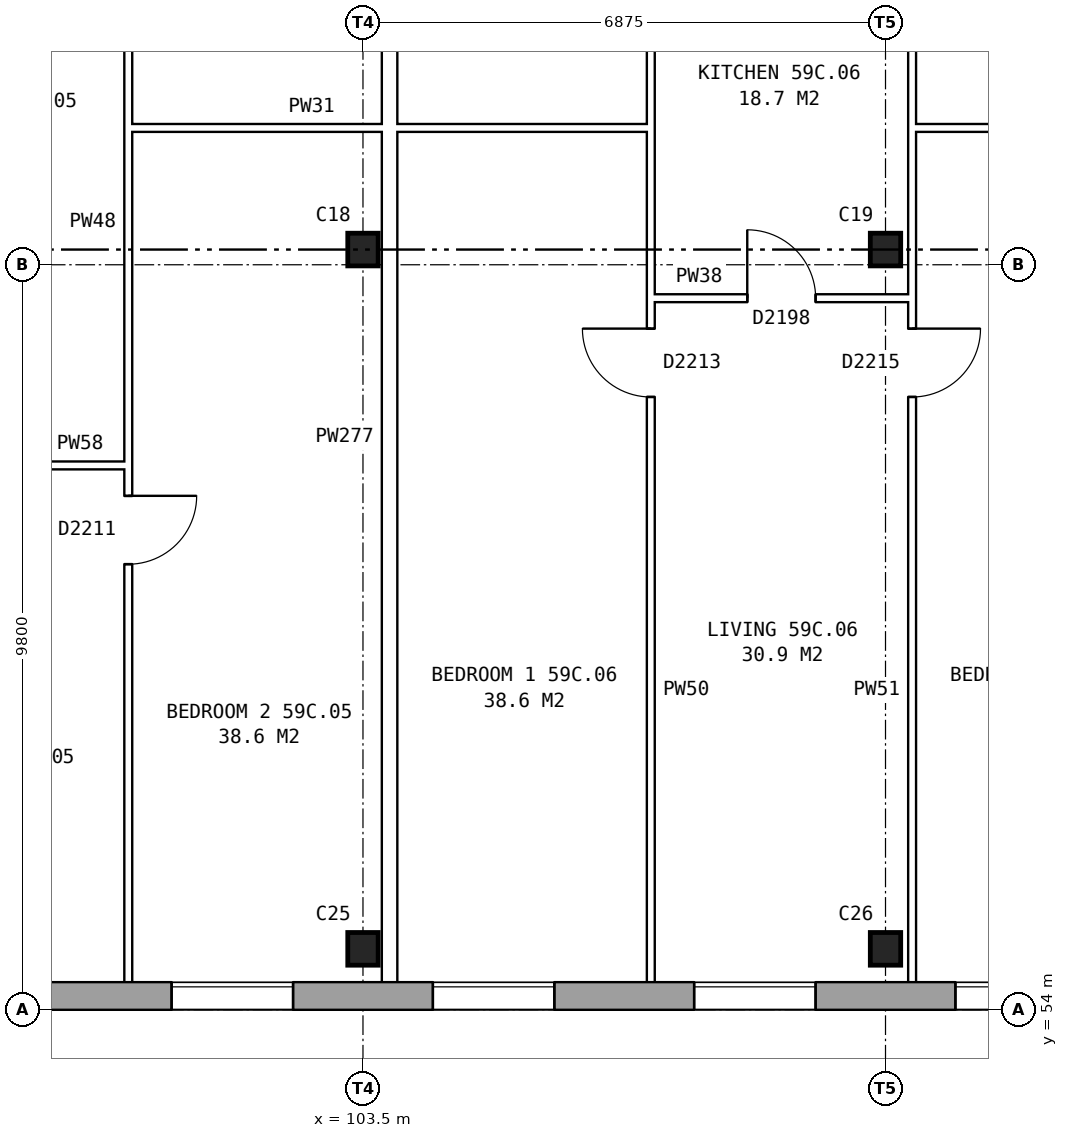
"""IFC4 building model, lengths in metres.
Left out: names, types, materials, properties, quantities, classifications, styles, units other than length and angle.
Written with IfcOpenShell. Run it as: python <this file> out.ifc"""

import sys

from ifc_helpers import new_model, si_unit, direction, frame, frame_2d, origin, origin_2d, place, context, subcontext, project, spatial, rectangle, i_section, extrude, element, fill, save


model = new_model("IFC4")
c1 = context("Model", 3, precision=1e-05, world=origin(), true_north=direction((0.0, 1.0)))
c2 = subcontext(c1, "Body", "Model", "MODEL_VIEW")
j1 = project(units=[si_unit("LENGTHUNIT", "METRE"), si_unit("PLANEANGLEUNIT", "RADIAN")], contexts=[c1])
p1 = place(None, origin())
s1 = spatial("IfcSite", under=j1, at=p1, CompositionType="ELEMENT")
p2 = place(p1, origin())
s2 = spatial("IfcBuilding", under=s1, at=p2, CompositionType="ELEMENT")
p3 = place(p2, frame((0.0, 0.0, 209.0)))
s3 = spatial("IfcBuildingStorey", under=s2, at=p3, CompositionType="ELEMENT", Elevation=209.0)
for number, where, z_axis, x_axis in (
    (1, (103.5, 54.8, 0.0), (0.0, 0.0, 1.0), (1.0, 0.0, 0.0)),
    (2, (110.375, 54.8, 0.0), (0.0, 0.0, 1.0), (1.0, 0.0, 0.0)),
    (3, (103.5, 64.0, 0.0), (0.0, 0.0, 1.0), (1.0, 0.0, 0.0)),
    (4, (110.375, 64.0, 0.0), (0.0, 0.0, 1.0), (1.0, 0.0, 0.0)),
):
    element("IfcColumn", number, at=place(p3, frame(where, z_axis=z_axis, x_axis=x_axis)), inside=s3, PredefinedType="COLUMN", context=c2, shape_type="SweptSolid", body=[
        extrude(i_section(OverallWidth=0.4, OverallDepth=0.43, WebThickness=0.04, FlangeThickness=0.04, at=origin_2d()), origin(), (0.0, 0.0, 1.0), 2.85),
    ])
p4 = place(p3, frame((75.95, 54.18, 0.0), z_axis=(0.0, 0.0, 1.0), x_axis=(1.0, 0.0, 0.0)))
e5 = element("IfcWall", 5, at=p4, inside=s3, PredefinedType="STANDARD", context=c2, shape_type="SweptSolid", body=[
    extrude(rectangle(XDim=55.1, YDim=0.36, at=frame_2d((27.55, 0.0))), origin(), (0.0, 0.0, 1.0), 2.85),
])
p5 = place(p4, frame((0.969, 0.0, 0.8)))
e6 = element("IfcOpeningElement", 6, at=p5, cuts=e5, PredefinedType="OPENING", context=c2, shape_type="SweptSolid", body=[
    extrude(rectangle(XDim=1.6, YDim=1.8, at=frame_2d((0.8, 0.9))), frame((0.0, 0.19, 0.0), z_axis=(0.0, -1.0, 0.0), x_axis=(1.0, 0.0, 0.0)), (0.0, 0.0, 1.0), 0.38),
])
p6 = place(p4, frame((4.406, 0.0, 0.8)))
e7 = element("IfcOpeningElement", 7, at=p6, cuts=e5, PredefinedType="OPENING", context=c2, shape_type="SweptSolid", body=[
    extrude(rectangle(XDim=1.6, YDim=1.8, at=frame_2d((0.8, 0.9))), frame((0.0, 0.19, 0.0), z_axis=(0.0, -1.0, 0.0), x_axis=(1.0, 0.0, 0.0)), (0.0, 0.0, 1.0), 0.38),
])
p7 = place(p4, frame((7.844, 0.0, 0.8)))
e8 = element("IfcOpeningElement", 8, at=p7, cuts=e5, PredefinedType="OPENING", context=c2, shape_type="SweptSolid", body=[
    extrude(rectangle(XDim=1.6, YDim=1.8, at=frame_2d((0.8, 0.9))), frame((0.0, 0.19, 0.0), z_axis=(0.0, -1.0, 0.0), x_axis=(1.0, 0.0, 0.0)), (0.0, 0.0, 1.0), 0.38),
])
p8 = place(p4, frame((11.281, 0.0, 0.8)))
e9 = element("IfcOpeningElement", 9, at=p8, cuts=e5, PredefinedType="OPENING", context=c2, shape_type="SweptSolid", body=[
    extrude(rectangle(XDim=1.6, YDim=1.8, at=frame_2d((0.8, 0.9))), frame((0.0, 0.19, 0.0), z_axis=(0.0, -1.0, 0.0), x_axis=(1.0, 0.0, 0.0)), (0.0, 0.0, 1.0), 0.38),
])
p9 = place(p4, frame((14.719, 0.0, 0.8)))
e10 = element("IfcOpeningElement", 10, at=p9, cuts=e5, PredefinedType="OPENING", context=c2, shape_type="SweptSolid", body=[
    extrude(rectangle(XDim=1.6, YDim=1.8, at=frame_2d((0.8, 0.9))), frame((0.0, 0.19, 0.0), z_axis=(0.0, -1.0, 0.0), x_axis=(1.0, 0.0, 0.0)), (0.0, 0.0, 1.0), 0.38),
])
p10 = place(p4, frame((18.156, 0.0, 0.8)))
e11 = element("IfcOpeningElement", 11, at=p10, cuts=e5, PredefinedType="OPENING", context=c2, shape_type="SweptSolid", body=[
    extrude(rectangle(XDim=1.6, YDim=1.8, at=frame_2d((0.8, 0.9))), frame((0.0, 0.19, 0.0), z_axis=(0.0, -1.0, 0.0), x_axis=(1.0, 0.0, 0.0)), (0.0, 0.0, 1.0), 0.38),
])
p11 = place(p4, frame((21.594, 0.0, 0.8)))
e12 = element("IfcOpeningElement", 12, at=p11, cuts=e5, PredefinedType="OPENING", context=c2, shape_type="SweptSolid", body=[
    extrude(rectangle(XDim=1.6, YDim=1.8, at=frame_2d((0.8, 0.9))), frame((0.0, 0.19, 0.0), z_axis=(0.0, -1.0, 0.0), x_axis=(1.0, 0.0, 0.0)), (0.0, 0.0, 1.0), 0.38),
])
p12 = place(p4, frame((25.031, 0.0, 0.8)))
e13 = element("IfcOpeningElement", 13, at=p12, cuts=e5, PredefinedType="OPENING", context=c2, shape_type="SweptSolid", body=[
    extrude(rectangle(XDim=1.6, YDim=1.8, at=frame_2d((0.8, 0.9))), frame((0.0, 0.19, 0.0), z_axis=(0.0, -1.0, 0.0), x_axis=(1.0, 0.0, 0.0)), (0.0, 0.0, 1.0), 0.38),
])
p13 = place(p4, frame((28.469, 0.0, 0.8)))
e14 = element("IfcOpeningElement", 14, at=p13, cuts=e5, PredefinedType="OPENING", context=c2, shape_type="SweptSolid", body=[
    extrude(rectangle(XDim=1.6, YDim=1.8, at=frame_2d((0.8, 0.9))), frame((0.0, 0.19, 0.0), z_axis=(0.0, -1.0, 0.0), x_axis=(1.0, 0.0, 0.0)), (0.0, 0.0, 1.0), 0.38),
])
p14 = place(p4, frame((31.906, 0.0, 0.8)))
e15 = element("IfcOpeningElement", 15, at=p14, cuts=e5, PredefinedType="OPENING", context=c2, shape_type="SweptSolid", body=[
    extrude(rectangle(XDim=1.6, YDim=1.8, at=frame_2d((0.8, 0.9))), frame((0.0, 0.19, 0.0), z_axis=(0.0, -1.0, 0.0), x_axis=(1.0, 0.0, 0.0)), (0.0, 0.0, 1.0), 0.38),
])
p15 = place(p4, frame((35.344, 0.0, 0.8)))
e16 = element("IfcOpeningElement", 16, at=p15, cuts=e5, PredefinedType="OPENING", context=c2, shape_type="SweptSolid", body=[
    extrude(rectangle(XDim=1.6, YDim=1.8, at=frame_2d((0.8, 0.9))), frame((0.0, 0.19, 0.0), z_axis=(0.0, -1.0, 0.0), x_axis=(1.0, 0.0, 0.0)), (0.0, 0.0, 1.0), 0.38),
])
p16 = place(p4, frame((38.781, 0.0, 0.8)))
e17 = element("IfcOpeningElement", 17, at=p16, cuts=e5, PredefinedType="OPENING", context=c2, shape_type="SweptSolid", body=[
    extrude(rectangle(XDim=1.6, YDim=1.8, at=frame_2d((0.8, 0.9))), frame((0.0, 0.19, 0.0), z_axis=(0.0, -1.0, 0.0), x_axis=(1.0, 0.0, 0.0)), (0.0, 0.0, 1.0), 0.38),
])
p17 = place(p4, frame((42.219, 0.0, 0.8)))
e18 = element("IfcOpeningElement", 18, at=p17, cuts=e5, PredefinedType="OPENING", context=c2, shape_type="SweptSolid", body=[
    extrude(rectangle(XDim=1.6, YDim=1.8, at=frame_2d((0.8, 0.9))), frame((0.0, 0.19, 0.0), z_axis=(0.0, -1.0, 0.0), x_axis=(1.0, 0.0, 0.0)), (0.0, 0.0, 1.0), 0.38),
])
p18 = place(p4, frame((45.656, 0.0, 0.8)))
e19 = element("IfcOpeningElement", 19, at=p18, cuts=e5, PredefinedType="OPENING", context=c2, shape_type="SweptSolid", body=[
    extrude(rectangle(XDim=1.6, YDim=1.8, at=frame_2d((0.8, 0.9))), frame((0.0, 0.19, 0.0), z_axis=(0.0, -1.0, 0.0), x_axis=(1.0, 0.0, 0.0)), (0.0, 0.0, 1.0), 0.38),
])
p19 = place(p4, frame((49.094, 0.0, 0.8)))
e20 = element("IfcOpeningElement", 20, at=p19, cuts=e5, PredefinedType="OPENING", context=c2, shape_type="SweptSolid", body=[
    extrude(rectangle(XDim=1.6, YDim=1.8, at=frame_2d((0.8, 0.9))), frame((0.0, 0.19, 0.0), z_axis=(0.0, -1.0, 0.0), x_axis=(1.0, 0.0, 0.0)), (0.0, 0.0, 1.0), 0.38),
])
p20 = place(p4, frame((52.531, 0.0, 0.8)))
e21 = element("IfcOpeningElement", 21, at=p20, cuts=e5, PredefinedType="OPENING", context=c2, shape_type="SweptSolid", body=[
    extrude(rectangle(XDim=1.6, YDim=1.8, at=frame_2d((0.8, 0.9))), frame((0.0, 0.19, 0.0), z_axis=(0.0, -1.0, 0.0), x_axis=(1.0, 0.0, 0.0)), (0.0, 0.0, 1.0), 0.38),
])
p21 = place(p3, frame((96.975, 61.16, 0.0), z_axis=(0.0, 0.0, 1.0), x_axis=(1.0, 0.0, 0.0)))
e22 = element("IfcWall", 22, at=p21, inside=s3, PredefinedType="PARTITIONING", context=c2, shape_type="SweptSolid", body=[
    extrude(rectangle(XDim=3.437, YDim=0.1, at=frame_2d((1.719, 0.0))), origin(), (0.0, 0.0, 1.0), 2.85),
])
p22 = place(p21, frame((1.269, 0.0, 0.0)))
e23 = element("IfcOpeningElement", 23, at=p22, cuts=e22, PredefinedType="OPENING", context=c2, shape_type="SweptSolid", body=[
    extrude(rectangle(XDim=0.9, YDim=2.1, at=frame_2d((0.45, 1.05))), frame((0.0, 0.06, 0.0), z_axis=(0.0, -1.0, 0.0), x_axis=(1.0, 0.0, 0.0)), (0.0, 0.0, 1.0), 0.12),
])
p23 = place(p3, frame((107.287, 63.36, 0.0), z_axis=(0.0, 0.0, 1.0), x_axis=(1.0, 0.0, 0.0)))
e24 = element("IfcWall", 24, at=p23, inside=s3, PredefinedType="PARTITIONING", context=c2, shape_type="SweptSolid", body=[
    extrude(rectangle(XDim=3.438, YDim=0.1, at=frame_2d((1.719, 0.0))), origin(), (0.0, 0.0, 1.0), 2.85),
])
p24 = place(p23, frame((1.269, 0.0, 0.0)))
e25 = element("IfcOpeningElement", 25, at=p24, cuts=e24, PredefinedType="OPENING", context=c2, shape_type="SweptSolid", body=[
    extrude(rectangle(XDim=0.9, YDim=2.1, at=frame_2d((0.45, 1.05))), frame((0.0, 0.06, 0.0), z_axis=(0.0, -1.0, 0.0), x_axis=(1.0, 0.0, 0.0)), (0.0, 0.0, 1.0), 0.12),
])
p25 = place(p3, frame((100.412, 65.6, 0.0), z_axis=(0.0, 0.0, 1.0), x_axis=(1.0, 0.0, 0.0)))
e26 = element("IfcWall", 26, at=p25, inside=s3, PredefinedType="PARTITIONING", context=c2, shape_type="SweptSolid", body=[
    extrude(rectangle(XDim=6.875, YDim=0.1, at=frame_2d((3.438, 0.0))), origin(), (0.0, 0.0, 1.0), 2.85),
])
p26 = place(p3, frame((110.725, 65.6, 0.0), z_axis=(0.0, 0.0, 1.0), x_axis=(1.0, 0.0, 0.0)))
e27 = element("IfcWall", 27, at=p26, inside=s3, PredefinedType="PARTITIONING", context=c2, shape_type="SweptSolid", body=[
    extrude(rectangle(XDim=3.337, YDim=0.1, at=frame_2d((1.668, 0.0))), origin(), (0.0, 0.0, 1.0), 2.85),
])
p27 = place(p3, frame((100.412, 54.36, 0.0), z_axis=(0.0, 0.0, 1.0), x_axis=(0.0, 1.0, 0.0)))
e28 = element("IfcWall", 28, at=p27, inside=s3, PredefinedType="PARTITIONING", context=c2, shape_type="SweptSolid", body=[
    extrude(rectangle(XDim=14.34, YDim=0.1, at=frame_2d((7.17, 0.0))), origin(), (0.0, 0.0, 1.0), 2.85),
])
p28 = place(p27, frame((5.5, 0.0, 0.0)))
e29 = element("IfcOpeningElement", 29, at=p28, cuts=e28, PredefinedType="OPENING", context=c2, shape_type="SweptSolid", body=[
    extrude(rectangle(XDim=0.9, YDim=2.1, at=frame_2d((0.45, 1.05))), frame((0.0, 0.06, 0.0), z_axis=(0.0, -1.0, 0.0), x_axis=(1.0, 0.0, 0.0)), (0.0, 0.0, 1.0), 0.12),
])
p29 = place(p27, frame((13.04, 0.0, 0.0)))
e30 = element("IfcOpeningElement", 30, at=p29, cuts=e28, PredefinedType="OPENING", context=c2, shape_type="SweptSolid", body=[
    extrude(rectangle(XDim=0.9, YDim=2.1, at=frame_2d((0.45, 1.05))), frame((0.0, 0.06, 0.0), z_axis=(0.0, -1.0, 0.0), x_axis=(1.0, 0.0, 0.0)), (0.0, 0.0, 1.0), 0.12),
])
p30 = place(p3, frame((103.85, 54.36, 0.0), z_axis=(0.0, 0.0, 1.0), x_axis=(0.0, 1.0, 0.0)))
e31 = element("IfcWall", 31, at=p30, inside=s3, PredefinedType="PARTITIONING", context=c2, shape_type="SweptSolid", body=[
    extrude(rectangle(XDim=14.34, YDim=0.2, at=frame_2d((7.17, 0.0))), origin(), (0.0, 0.0, 1.0), 2.85),
])
p31 = place(p3, frame((107.287, 54.36, 0.0), z_axis=(0.0, 0.0, 1.0), x_axis=(0.0, 1.0, 0.0)))
e32 = element("IfcWall", 32, at=p31, inside=s3, PredefinedType="PARTITIONING", context=c2, shape_type="SweptSolid", body=[
    extrude(rectangle(XDim=14.34, YDim=0.1, at=frame_2d((7.17, 0.0))), origin(), (0.0, 0.0, 1.0), 2.85),
])
p32 = place(p31, frame((7.7, 0.0, 0.0)))
e33 = element("IfcOpeningElement", 33, at=p32, cuts=e32, PredefinedType="OPENING", context=c2, shape_type="SweptSolid", body=[
    extrude(rectangle(XDim=0.9, YDim=2.1, at=frame_2d((0.45, 1.05))), frame((0.0, 0.06, 0.0), z_axis=(0.0, -1.0, 0.0), x_axis=(1.0, 0.0, 0.0)), (0.0, 0.0, 1.0), 0.12),
])
p33 = place(p31, frame((13.04, 0.0, 0.0)))
e34 = element("IfcOpeningElement", 34, at=p33, cuts=e32, PredefinedType="OPENING", context=c2, shape_type="SweptSolid", body=[
    extrude(rectangle(XDim=0.9, YDim=2.1, at=frame_2d((0.45, 1.05))), frame((0.0, 0.06, 0.0), z_axis=(0.0, -1.0, 0.0), x_axis=(1.0, 0.0, 0.0)), (0.0, 0.0, 1.0), 0.12),
])
p34 = place(p3, frame((110.725, 54.36, 0.0), z_axis=(0.0, 0.0, 1.0), x_axis=(0.0, 1.0, 0.0)))
e35 = element("IfcWall", 35, at=p34, inside=s3, PredefinedType="PARTITIONING", context=c2, shape_type="SweptSolid", body=[
    extrude(rectangle(XDim=14.34, YDim=0.1, at=frame_2d((7.17, 0.0))), origin(), (0.0, 0.0, 1.0), 2.85),
])
p35 = place(p34, frame((7.7, 0.0, 0.0)))
e36 = element("IfcOpeningElement", 36, at=p35, cuts=e35, PredefinedType="OPENING", context=c2, shape_type="SweptSolid", body=[
    extrude(rectangle(XDim=0.9, YDim=2.1, at=frame_2d((0.45, 1.05))), frame((0.0, 0.06, 0.0), z_axis=(0.0, -1.0, 0.0), x_axis=(1.0, 0.0, 0.0)), (0.0, 0.0, 1.0), 0.12),
])
p36 = place(p34, frame((13.04, 0.0, 0.0)))
e37 = element("IfcOpeningElement", 37, at=p36, cuts=e35, PredefinedType="OPENING", context=c2, shape_type="SweptSolid", body=[
    extrude(rectangle(XDim=0.9, YDim=2.1, at=frame_2d((0.45, 1.05))), frame((0.0, 0.06, 0.0), z_axis=(0.0, -1.0, 0.0), x_axis=(1.0, 0.0, 0.0)), (0.0, 0.0, 1.0), 0.12),
])
p37 = place(p12, origin())
e38 = element("IfcWindow", 38, at=p37, inside=s3, PartitioningType="SINGLE_PANEL", PredefinedType="WINDOW", context=c2, shape_type="SweptSolid", body=[
    extrude(rectangle(XDim=1.6, YDim=1.8, at=frame_2d((0.8, 0.9))), frame((0.0, 0.15, 0.0), z_axis=(0.0, -1.0, 0.0), x_axis=(1.0, 0.0, 0.0)), (0.0, 0.0, 1.0), 0.06),
])
fill(e13, e38)
p38 = place(p13, origin())
e39 = element("IfcWindow", 39, at=p38, inside=s3, PartitioningType="SINGLE_PANEL", PredefinedType="WINDOW", context=c2, shape_type="SweptSolid", body=[
    extrude(rectangle(XDim=1.6, YDim=1.8, at=frame_2d((0.8, 0.9))), frame((0.0, 0.15, 0.0), z_axis=(0.0, -1.0, 0.0), x_axis=(1.0, 0.0, 0.0)), (0.0, 0.0, 1.0), 0.06),
])
fill(e14, e39)
p39 = place(p14, origin())
e40 = element("IfcWindow", 40, at=p39, inside=s3, PartitioningType="SINGLE_PANEL", PredefinedType="WINDOW", context=c2, shape_type="SweptSolid", body=[
    extrude(rectangle(XDim=1.6, YDim=1.8, at=frame_2d((0.8, 0.9))), frame((0.0, 0.15, 0.0), z_axis=(0.0, -1.0, 0.0), x_axis=(1.0, 0.0, 0.0)), (0.0, 0.0, 1.0), 0.06),
])
fill(e15, e40)
p40 = place(p15, origin())
e41 = element("IfcWindow", 41, at=p40, inside=s3, PartitioningType="SINGLE_PANEL", PredefinedType="WINDOW", context=c2, shape_type="SweptSolid", body=[
    extrude(rectangle(XDim=1.6, YDim=1.8, at=frame_2d((0.8, 0.9))), frame((0.0, 0.15, 0.0), z_axis=(0.0, -1.0, 0.0), x_axis=(1.0, 0.0, 0.0)), (0.0, 0.0, 1.0), 0.06),
])
fill(e16, e41)
p41 = place(p28, frame((0.9, 0.0, 0.0), z_axis=(0.0, 0.0, 1.0), x_axis=(-1.0, 0.0, 0.0)))
e42 = element("IfcDoor", 42, at=p41, inside=s3, OperationType="SINGLE_SWING_LEFT", PredefinedType="DOOR", context=c2, shape_type="SweptSolid", body=[
    extrude(rectangle(XDim=0.9, YDim=2.1, at=frame_2d((0.45, 1.05))), frame((0.0, 0.025, 0.0), z_axis=(0.0, -1.0, 0.0), x_axis=(1.0, 0.0, 0.0)), (0.0, 0.0, 1.0), 0.05),
])
fill(e29, e42)
p42 = place(p32, origin())
e43 = element("IfcDoor", 43, at=p42, inside=s3, OperationType="SINGLE_SWING_RIGHT", PredefinedType="DOOR", context=c2, shape_type="SweptSolid", body=[
    extrude(rectangle(XDim=0.9, YDim=2.1, at=frame_2d((0.45, 1.05))), frame((0.0, 0.025, 0.0), z_axis=(0.0, -1.0, 0.0), x_axis=(1.0, 0.0, 0.0)), (0.0, 0.0, 1.0), 0.05),
])
fill(e33, e43)
p43 = place(p35, frame((0.9, 0.0, 0.0), z_axis=(0.0, 0.0, 1.0), x_axis=(-1.0, 0.0, 0.0)))
e44 = element("IfcDoor", 44, at=p43, inside=s3, OperationType="SINGLE_SWING_LEFT", PredefinedType="DOOR", context=c2, shape_type="SweptSolid", body=[
    extrude(rectangle(XDim=0.9, YDim=2.1, at=frame_2d((0.45, 1.05))), frame((0.0, 0.025, 0.0), z_axis=(0.0, -1.0, 0.0), x_axis=(1.0, 0.0, 0.0)), (0.0, 0.0, 1.0), 0.05),
])
fill(e36, e44)
p44 = place(p24, origin())
e45 = element("IfcDoor", 45, at=p44, inside=s3, OperationType="SINGLE_SWING_LEFT", PredefinedType="DOOR", context=c2, shape_type="SweptSolid", body=[
    extrude(rectangle(XDim=0.9, YDim=2.1, at=frame_2d((0.45, 1.05))), frame((0.0, 0.025, 0.0), z_axis=(0.0, -1.0, 0.0), x_axis=(1.0, 0.0, 0.0)), (0.0, 0.0, 1.0), 0.05),
])
fill(e25, e45)
save(model, sys.argv[1])
